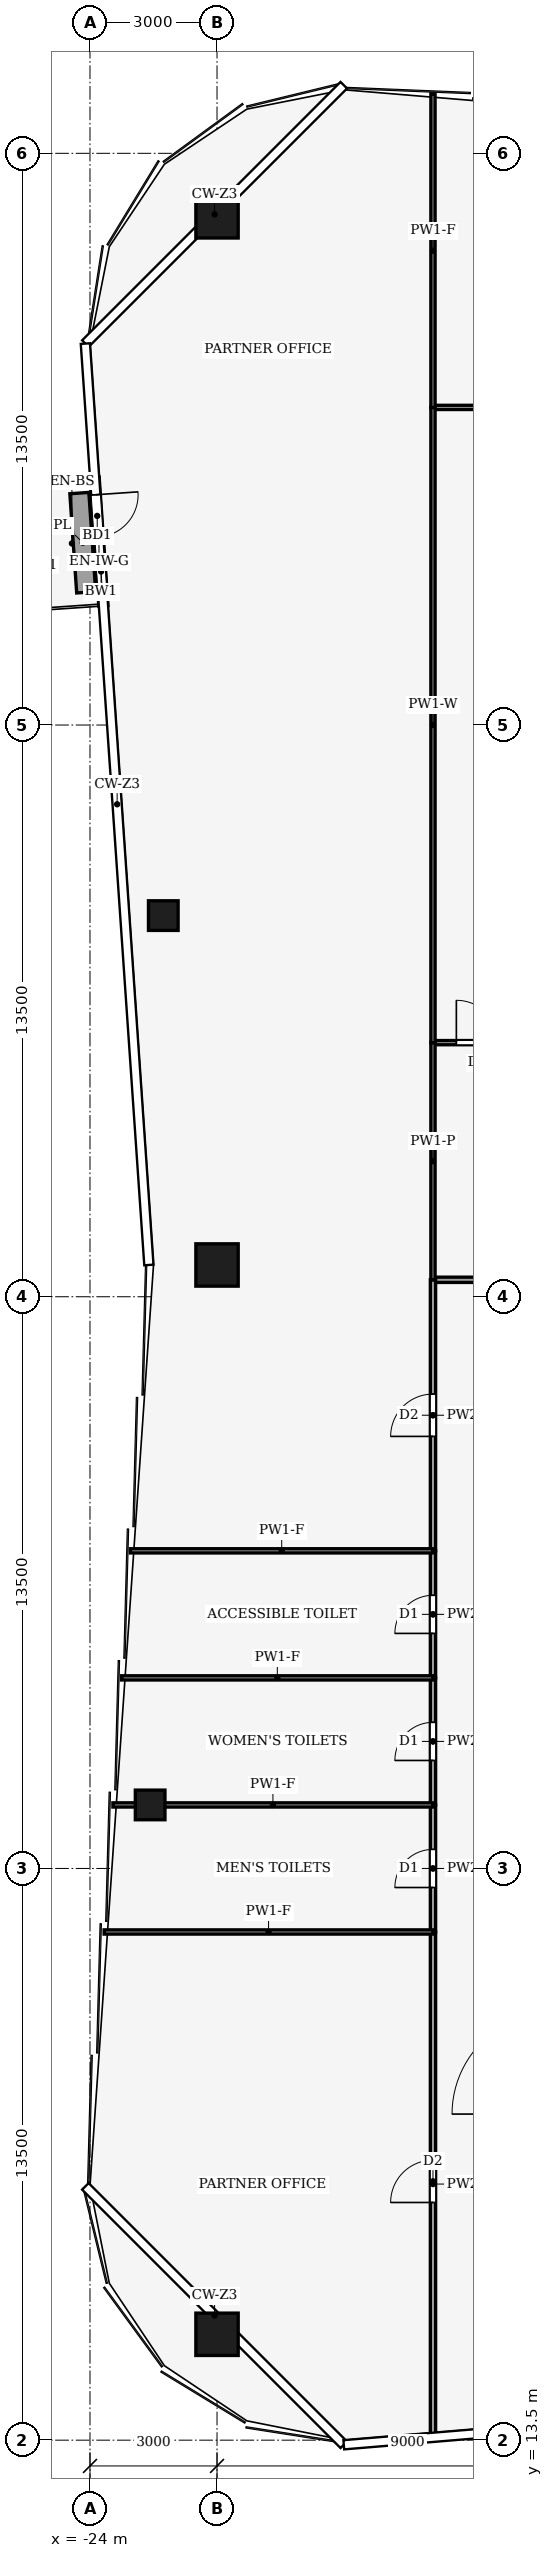
"""IFC4 building model, lengths in metres.
Left out: names, types, materials, properties, quantities, classifications, styles, units other than length and angle.
Written with IfcOpenShell. Run it as: python <this file> out.ifc"""

import sys

from ifc_helpers import new_model, si_unit, direction, frame, frame_2d, origin, origin_2d, place, context, subcontext, project, spatial, rectangle, hollow_rectangle, extrude, element, fill, save


model = new_model("IFC4")
c1 = context("Model", 3, precision=1e-05, world=origin(), true_north=direction((0.0, 1.0)))
c2 = subcontext(c1, "Body", "Model", "MODEL_VIEW")
j1 = project(units=[si_unit("LENGTHUNIT", "METRE"), si_unit("PLANEANGLEUNIT", "RADIAN")], contexts=[c1])
p1 = place(None, origin())
s1 = spatial("IfcSite", under=j1, at=p1, CompositionType="ELEMENT")
p2 = place(p1, origin())
s2 = spatial("IfcBuilding", under=s1, at=p2, CompositionType="ELEMENT")
p3 = place(p2, frame((0.0, 0.0, 190.0)))
s3 = spatial("IfcBuildingStorey", under=s2, at=p3, CompositionType="ELEMENT", Elevation=190.0)
for number, where, z_axis, x_axis in (
    (1, (-21.0, 66.0, 0.0), (0.0, 0.0, 1.0), (1.0, 0.0, 0.0)),
    (2, (-21.0, 16.0, 0.0), (0.0, 0.0, 1.0), (1.0, 0.0, 0.0)),
    (3, (-21.0, 41.25, 0.0), (0.0, 0.0, 1.0), (1.0, 0.0, 0.0)),
):
    element("IfcColumn", number, at=place(p3, frame(where, z_axis=z_axis, x_axis=x_axis)), inside=s3, PredefinedType="COLUMN", context=c2, shape_type="SweptSolid", body=[
        extrude(hollow_rectangle(XDim=1.0, YDim=1.0, WallThickness=0.06, at=origin_2d()), origin(), (0.0, 0.0, 1.0), 4.0),
    ])
for number, where, z_axis, x_axis in (
    (4, (-22.579, 28.5, 0.0), (0.0, 0.0, 1.0), (1.0, 0.0, 0.0)),
    (5, (-22.269, 49.5, 0.0), (0.0, 0.0, 1.0), (1.0, 0.0, 0.0)),
):
    element("IfcColumn", number, at=place(p3, frame(where, z_axis=z_axis, x_axis=x_axis)), inside=s3, PredefinedType="COLUMN", context=c2, shape_type="SweptSolid", body=[
        extrude(hollow_rectangle(XDim=0.7, YDim=0.7, WallThickness=0.03, at=origin_2d()), origin(), (0.0, 0.0, 1.0), 4.0),
    ])
p4 = place(p3, frame((-23.892, 59.853, 0.0), z_axis=(0.0, 0.0, 1.0), x_axis=(0.068788350144, -0.997631276016, 0.0)))
e6 = element("IfcWall", 6, at=p4, inside=s3, PredefinedType="SOLIDWALL", context=c2, shape_type="SweptSolid", body=[
    extrude(rectangle(XDim=3.049, YDim=0.218, at=frame_2d((1.524, 0.0))), origin(), (0.0, 0.0, 1.0), 3.65),
])
p5 = place(p4, frame((0.416, 0.0, 0.0)))
e7 = element("IfcOpeningElement", 7, at=p5, cuts=e6, PredefinedType="OPENING", context=c2, shape_type="SweptSolid", body=[
    extrude(rectangle(XDim=1.0, YDim=2.1, at=frame_2d((0.5, 1.05))), frame((0.0, 0.119, 0.0), z_axis=(0.0, -1.0, 0.0), x_axis=(1.0, 0.0, 0.0)), (0.0, 0.0, 1.0), 0.238),
])
p6 = place(p4, frame((1.832, 0.0, 0.9)))
e8 = element("IfcOpeningElement", 8, at=p6, cuts=e6, PredefinedType="OPENING", context=c2, shape_type="SweptSolid", body=[
    extrude(rectangle(XDim=0.8, YDim=1.2, at=frame_2d((0.4, 0.6))), frame((0.0, 0.119, 0.0), z_axis=(0.0, -1.0, 0.0), x_axis=(1.0, 0.0, 0.0)), (0.0, 0.0, 1.0), 0.238),
])
p7 = place(p3, frame((-24.251, 59.477, 0.0), z_axis=(0.0, 0.0, 1.0), x_axis=(0.068816361971, -0.997629344158, 0.0)))
e9 = element("IfcWall", 9, at=p7, inside=s3, PredefinedType="USERDEFINED", context=c2, shape_type="SweptSolid", body=[
    extrude(rectangle(XDim=2.349, YDim=0.45, at=frame_2d((1.174, 0.0))), origin(), (0.0, 0.0, 1.0), 0.4),
])
p8 = place(p3, frame((-15.9, 40.9, 0.0), z_axis=(0.0, 0.0, 1.0), x_axis=(1.0, 0.0, 0.0)))
e10 = element("IfcWall", 10, at=p8, inside=s3, PredefinedType="PARTITIONING", context=c2, shape_type="SweptSolid", body=[
    extrude(rectangle(XDim=6.9, YDim=0.125, at=frame_2d((3.45, 0.0))), origin(), (0.0, 0.0, 1.0), 3.44),
])
p9 = place(p8, frame((2.95, 0.0, 0.0)))
e11 = element("IfcOpeningElement", 11, at=p9, cuts=e10, PredefinedType="OPENING", context=c2, shape_type="SweptSolid", body=[
    extrude(rectangle(XDim=1.0, YDim=2.1, at=frame_2d((0.5, 1.05))), frame((0.0, 0.073, 0.0), z_axis=(0.0, -1.0, 0.0), x_axis=(1.0, 0.0, 0.0)), (0.0, 0.0, 1.0), 0.145),
])
p10 = place(p3, frame((-15.9, 13.595, 0.0), z_axis=(0.0, 0.0, 1.0), x_axis=(0.0, 1.0, 0.0)))
e12 = element("IfcWall", 12, at=p10, inside=s3, PredefinedType="PARTITIONING", context=c2, shape_type="SweptSolid", body=[
    extrude(rectangle(XDim=11.905, YDim=0.125, at=frame_2d((5.953, 0.0))), origin(), (0.0, 0.0, 1.0), 3.04),
])
p11 = place(p10, frame((5.518, 0.0, 0.0)))
e13 = element("IfcOpeningElement", 13, at=p11, cuts=e12, PredefinedType="OPENING", context=c2, shape_type="SweptSolid", body=[
    extrude(rectangle(XDim=1.0, YDim=2.1, at=frame_2d((0.5, 1.05))), frame((0.0, 0.073, 0.0), z_axis=(0.0, -1.0, 0.0), x_axis=(1.0, 0.0, 0.0)), (0.0, 0.0, 1.0), 0.145),
])
p12 = place(p3, frame((-15.9, 25.5, 0.0), z_axis=(0.0, 0.0, 1.0), x_axis=(0.0, 1.0, 0.0)))
e14 = element("IfcWall", 14, at=p12, inside=s3, PredefinedType="PARTITIONING", context=c2, shape_type="SweptSolid", body=[
    extrude(rectangle(XDim=3.0, YDim=0.125, at=frame_2d((1.5, 0.0))), origin(), (0.0, 0.0, 1.0), 3.87),
])
p13 = place(p12, frame((1.05, 0.0, 0.0)))
e15 = element("IfcOpeningElement", 15, at=p13, cuts=e14, PredefinedType="OPENING", context=c2, shape_type="SweptSolid", body=[
    extrude(rectangle(XDim=0.9, YDim=2.1, at=frame_2d((0.45, 1.05))), frame((0.0, 0.073, 0.0), z_axis=(0.0, -1.0, 0.0), x_axis=(1.0, 0.0, 0.0)), (0.0, 0.0, 1.0), 0.145),
])
p14 = place(p3, frame((-15.9, 28.5, 0.0), z_axis=(0.0, 0.0, 1.0), x_axis=(0.0, 1.0, 0.0)))
e16 = element("IfcWall", 16, at=p14, inside=s3, PredefinedType="PARTITIONING", context=c2, shape_type="SweptSolid", body=[
    extrude(rectangle(XDim=3.0, YDim=0.125, at=frame_2d((1.5, 0.0))), origin(), (0.0, 0.0, 1.0), 3.87),
])
p15 = place(p14, frame((1.05, 0.0, 0.0)))
e17 = element("IfcOpeningElement", 17, at=p15, cuts=e16, PredefinedType="OPENING", context=c2, shape_type="SweptSolid", body=[
    extrude(rectangle(XDim=0.9, YDim=2.1, at=frame_2d((0.45, 1.05))), frame((0.0, 0.073, 0.0), z_axis=(0.0, -1.0, 0.0), x_axis=(1.0, 0.0, 0.0)), (0.0, 0.0, 1.0), 0.145),
])
p16 = place(p3, frame((-15.9, 31.5, 0.0), z_axis=(0.0, 0.0, 1.0), x_axis=(0.0, 1.0, 0.0)))
e18 = element("IfcWall", 18, at=p16, inside=s3, PredefinedType="PARTITIONING", context=c2, shape_type="SweptSolid", body=[
    extrude(rectangle(XDim=3.0, YDim=0.125, at=frame_2d((1.5, 0.0))), origin(), (0.0, 0.0, 1.0), 3.87),
])
p17 = place(p16, frame((1.05, 0.0, 0.0)))
e19 = element("IfcOpeningElement", 19, at=p17, cuts=e18, PredefinedType="OPENING", context=c2, shape_type="SweptSolid", body=[
    extrude(rectangle(XDim=0.9, YDim=2.1, at=frame_2d((0.45, 1.05))), frame((0.0, 0.073, 0.0), z_axis=(0.0, -1.0, 0.0), x_axis=(1.0, 0.0, 0.0)), (0.0, 0.0, 1.0), 0.145),
])
p18 = place(p3, frame((-15.9, 34.5, 0.0), z_axis=(0.0, 0.0, 1.0), x_axis=(0.0, 1.0, 0.0)))
e20 = element("IfcWall", 20, at=p18, inside=s3, PredefinedType="PARTITIONING", context=c2, shape_type="SweptSolid", body=[
    extrude(rectangle(XDim=6.404, YDim=0.125, at=frame_2d((3.202, 0.0))), origin(), (0.0, 0.0, 1.0), 3.14),
])
p19 = place(p18, frame((2.702, 0.0, 0.0)))
e21 = element("IfcOpeningElement", 21, at=p19, cuts=e20, PredefinedType="OPENING", context=c2, shape_type="SweptSolid", body=[
    extrude(rectangle(XDim=1.0, YDim=2.1, at=frame_2d((0.5, 1.05))), frame((0.0, 0.073, 0.0), z_axis=(0.0, -1.0, 0.0), x_axis=(1.0, 0.0, 0.0)), (0.0, 0.0, 1.0), 0.145),
])
p20 = place(p3, frame((-15.9, 46.5, 0.0), z_axis=(0.0, 0.0, 1.0), x_axis=(1.0, 0.0, 0.0)))
e22 = element("IfcWall", 22, at=p20, inside=s3, PredefinedType="PARTITIONING", context=c2, shape_type="SweptSolid", body=[
    extrude(rectangle(XDim=6.904, YDim=0.1, at=frame_2d((3.452, 0.0))), origin(), (0.0, 0.0, 1.0), 3.44),
])
p21 = place(p20, frame((0.552, 0.0, 0.0)))
e23 = element("IfcOpeningElement", 23, at=p21, cuts=e22, PredefinedType="OPENING", context=c2, shape_type="SweptSolid", body=[
    extrude(rectangle(XDim=1.0, YDim=2.1, at=frame_2d((0.5, 1.05))), frame((0.0, 0.06, 0.0), z_axis=(0.0, -1.0, 0.0), x_axis=(1.0, 0.0, 0.0)), (0.0, 0.0, 1.0), 0.12),
])
p22 = place(p3, frame((-15.9, 46.504, 0.0), z_axis=(0.0, 0.0, 1.0), x_axis=(0.0, -1.0, 0.0)))
e24 = element("IfcWall", 24, at=p22, inside=s3, PredefinedType="PARTITIONING", context=c2, shape_type="SweptSolid", body=[
    extrude(rectangle(XDim=5.608, YDim=0.1, at=frame_2d((2.804, 0.0))), origin(), (0.0, 0.0, 1.0), 3.44),
])
p23 = place(p3, frame((-15.9, 61.5, 0.0), z_axis=(0.0, 0.0, 1.0), x_axis=(1.0, 0.0, 0.0)))
e25 = element("IfcWall", 25, at=p23, inside=s3, PredefinedType="PARTITIONING", context=c2, shape_type="SweptSolid", body=[
    extrude(rectangle(XDim=9.9, YDim=0.1, at=frame_2d((4.95, 0.0))), origin(), (0.0, 0.0, 1.0), 3.24),
])
p24 = place(p23, frame((4.45, 0.0, 0.0)))
e26 = element("IfcOpeningElement", 26, at=p24, cuts=e25, PredefinedType="OPENING", context=c2, shape_type="SweptSolid", body=[
    extrude(rectangle(XDim=1.0, YDim=2.1, at=frame_2d((0.5, 1.05))), frame((0.0, 0.06, 0.0), z_axis=(0.0, -1.0, 0.0), x_axis=(1.0, 0.0, 0.0)), (0.0, 0.0, 1.0), 0.12),
])
p25 = place(p3, frame((-15.9, 61.504, 0.0), z_axis=(0.0, 0.0, 1.0), x_axis=(0.0, -1.0, 0.0)))
e27 = element("IfcWall", 27, at=p25, inside=s3, PredefinedType="PARTITIONING", context=c2, shape_type="SweptSolid", body=[
    extrude(rectangle(XDim=15.008, YDim=0.1, at=frame_2d((7.504, 0.0))), origin(), (0.0, 0.0, 1.0), 3.24),
])
p26 = place(p3, frame((-15.9, 68.905, 0.0), z_axis=(0.0, 0.0, 1.0), x_axis=(0.0, -1.0, 0.0)))
e28 = element("IfcWall", 28, at=p26, inside=s3, PredefinedType="PARTITIONING", context=c2, shape_type="SweptSolid", body=[
    extrude(rectangle(XDim=7.409, YDim=0.1, at=frame_2d((3.705, 0.0))), origin(), (0.0, 0.0, 1.0), 3.04),
])
p27 = place(p3, frame((-15.9, 25.5, 0.0), z_axis=(0.0, 0.0, 1.0), x_axis=(-1.0, 0.0, 0.0)))
e29 = element("IfcWall", 29, at=p27, inside=s3, PredefinedType="PARTITIONING", context=c2, shape_type="SweptSolid", body=[
    extrude(rectangle(XDim=7.766, YDim=0.1, at=frame_2d((3.883, 0.0))), origin(), (0.0, 0.0, 1.0), 3.04),
])
p28 = place(p3, frame((-15.9, 28.5, 0.0), z_axis=(0.0, 0.0, 1.0), x_axis=(-1.0, 0.0, 0.0)))
e30 = element("IfcWall", 30, at=p28, inside=s3, PredefinedType="PARTITIONING", context=c2, shape_type="SweptSolid", body=[
    extrude(rectangle(XDim=7.559, YDim=0.1, at=frame_2d((3.78, 0.0))), origin(), (0.0, 0.0, 1.0), 3.04),
])
p29 = place(p3, frame((-15.9, 31.5, 0.0), z_axis=(0.0, 0.0, 1.0), x_axis=(-1.0, 0.0, 0.0)))
e31 = element("IfcWall", 31, at=p29, inside=s3, PredefinedType="PARTITIONING", context=c2, shape_type="SweptSolid", body=[
    extrude(rectangle(XDim=7.353, YDim=0.1, at=frame_2d((3.676, 0.0))), origin(), (0.0, 0.0, 1.0), 3.04),
])
p30 = place(p3, frame((-15.9, 34.5, 0.0), z_axis=(0.0, 0.0, 1.0), x_axis=(-1.0, 0.0, 0.0)))
e32 = element("IfcWall", 32, at=p30, inside=s3, PredefinedType="PARTITIONING", context=c2, shape_type="SweptSolid", body=[
    extrude(rectangle(XDim=7.146, YDim=0.1, at=frame_2d((3.573, 0.0))), origin(), (0.0, 0.0, 1.0), 3.04),
])
p31 = place(p5, origin())
e33 = element("IfcDoor", 33, at=p31, inside=s3, OperationType="SINGLE_SWING_LEFT", PredefinedType="DOOR", context=c2, shape_type="SweptSolid", body=[
    extrude(rectangle(XDim=1.0, YDim=2.1, at=frame_2d((0.5, 1.05))), frame((0.0, 0.025, 0.0), z_axis=(0.0, -1.0, 0.0), x_axis=(1.0, 0.0, 0.0)), (0.0, 0.0, 1.0), 0.05),
])
fill(e7, e33)
p32 = place(p6, origin())
e34 = element("IfcWindow", 34, at=p32, inside=s3, PartitioningType="SINGLE_PANEL", PredefinedType="WINDOW", context=c2, shape_type="SweptSolid", body=[
    extrude(rectangle(XDim=0.8, YDim=1.2, at=frame_2d((0.4, 0.6))), frame((0.0, 0.03, 0.0), z_axis=(0.0, -1.0, 0.0), x_axis=(1.0, 0.0, 0.0)), (0.0, 0.0, 1.0), 0.06),
])
fill(e8, e34)
p33 = place(p11, origin())
e35 = element("IfcDoor", 35, at=p33, inside=s3, OperationType="SINGLE_SWING_RIGHT", PredefinedType="DOOR", context=c2, shape_type="SweptSolid", body=[
    extrude(rectangle(XDim=1.0, YDim=2.1, at=frame_2d((0.5, 1.05))), frame((0.0, 0.025, 0.0), z_axis=(0.0, -1.0, 0.0), x_axis=(1.0, 0.0, 0.0)), (0.0, 0.0, 1.0), 0.05),
])
fill(e13, e35)
p34 = place(p13, origin())
e36 = element("IfcDoor", 36, at=p34, inside=s3, OperationType="SINGLE_SWING_RIGHT", PredefinedType="DOOR", context=c2, shape_type="SweptSolid", body=[
    extrude(rectangle(XDim=0.9, YDim=2.1, at=frame_2d((0.45, 1.05))), frame((0.0, 0.025, 0.0), z_axis=(0.0, -1.0, 0.0), x_axis=(1.0, 0.0, 0.0)), (0.0, 0.0, 1.0), 0.05),
])
fill(e15, e36)
p35 = place(p15, origin())
e37 = element("IfcDoor", 37, at=p35, inside=s3, OperationType="SINGLE_SWING_LEFT", PredefinedType="DOOR", context=c2, shape_type="SweptSolid", body=[
    extrude(rectangle(XDim=0.9, YDim=2.1, at=frame_2d((0.45, 1.05))), frame((0.0, 0.025, 0.0), z_axis=(0.0, -1.0, 0.0), x_axis=(1.0, 0.0, 0.0)), (0.0, 0.0, 1.0), 0.05),
])
fill(e17, e37)
p36 = place(p17, origin())
e38 = element("IfcDoor", 38, at=p36, inside=s3, OperationType="SINGLE_SWING_RIGHT", PredefinedType="DOOR", context=c2, shape_type="SweptSolid", body=[
    extrude(rectangle(XDim=0.9, YDim=2.1, at=frame_2d((0.45, 1.05))), frame((0.0, 0.025, 0.0), z_axis=(0.0, -1.0, 0.0), x_axis=(1.0, 0.0, 0.0)), (0.0, 0.0, 1.0), 0.05),
])
fill(e19, e38)
p37 = place(p19, origin())
e39 = element("IfcDoor", 39, at=p37, inside=s3, OperationType="SINGLE_SWING_LEFT", PredefinedType="DOOR", context=c2, shape_type="SweptSolid", body=[
    extrude(rectangle(XDim=1.0, YDim=2.1, at=frame_2d((0.5, 1.05))), frame((0.0, 0.025, 0.0), z_axis=(0.0, -1.0, 0.0), x_axis=(1.0, 0.0, 0.0)), (0.0, 0.0, 1.0), 0.05),
])
fill(e21, e39)
p38 = place(p21, origin())
e40 = element("IfcDoor", 40, at=p38, inside=s3, OperationType="SINGLE_SWING_LEFT", PredefinedType="DOOR", context=c2, shape_type="SweptSolid", body=[
    extrude(rectangle(XDim=1.0, YDim=2.1, at=frame_2d((0.5, 1.05))), frame((0.0, 0.025, 0.0), z_axis=(0.0, -1.0, 0.0), x_axis=(1.0, 0.0, 0.0)), (0.0, 0.0, 1.0), 0.05),
])
fill(e23, e40)
save(model, sys.argv[1])
